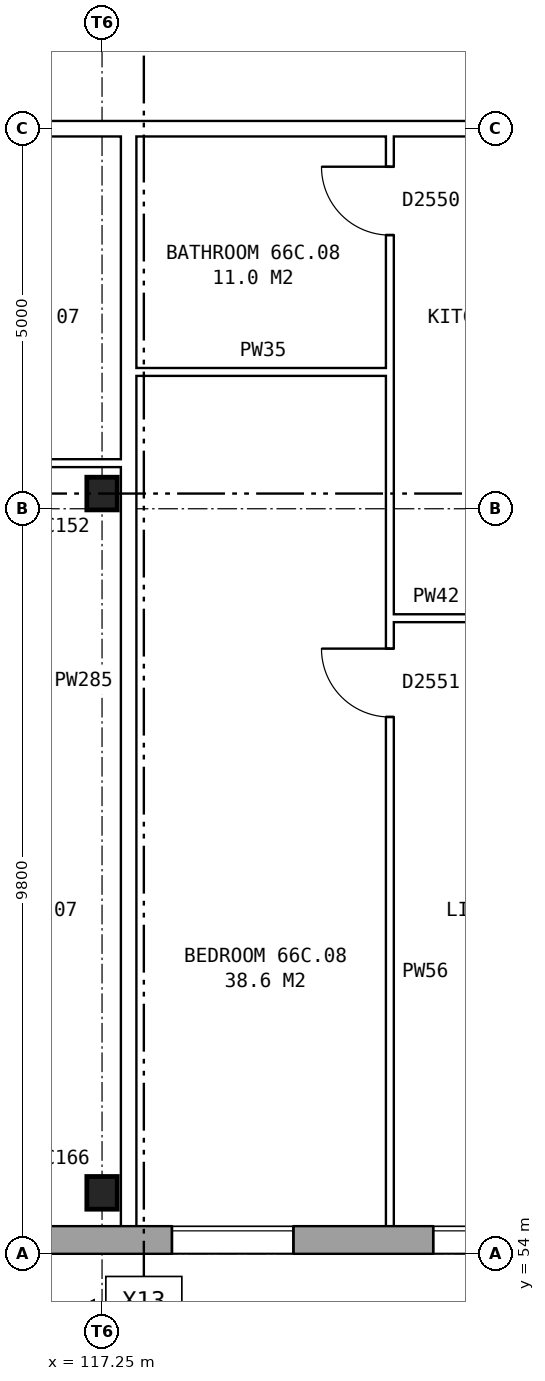
"""IFC4 building model, lengths in metres.
Left out: names, types, materials, properties, quantities, classifications, styles, units other than length and angle.
Written with IfcOpenShell. Run it as: python <this file> out.ifc"""

import sys

from ifc_helpers import new_model, si_unit, direction, frame, frame_2d, origin, origin_2d, place, context, subcontext, project, spatial, rectangle, i_section, extrude, element, fill, save


model = new_model("IFC4")
c1 = context("Model", 3, precision=1e-05, world=origin(), true_north=direction((0.0, 1.0)))
c2 = subcontext(c1, "Body", "Model", "MODEL_VIEW")
j1 = project(units=[si_unit("LENGTHUNIT", "METRE"), si_unit("PLANEANGLEUNIT", "RADIAN")], contexts=[c1])
p1 = place(None, origin())
s1 = spatial("IfcSite", under=j1, at=p1, CompositionType="ELEMENT")
p2 = place(p1, origin())
s2 = spatial("IfcBuilding", under=s1, at=p2, CompositionType="ELEMENT")
p3 = place(p2, frame((0.0, 0.0, 233.8)))
s3 = spatial("IfcBuildingStorey", under=s2, at=p3, CompositionType="ELEMENT", Elevation=233.8)
for number, where, z_axis, x_axis in (
    (1, (117.25, 54.8, 0.0), (0.0, 0.0, 1.0), (1.0, 0.0, 0.0)),
    (2, (117.25, 64.0, 0.0), (0.0, 0.0, 1.0), (1.0, 0.0, 0.0)),
):
    element("IfcColumn", number, at=place(p3, frame(where, z_axis=z_axis, x_axis=x_axis)), inside=s3, PredefinedType="COLUMN", context=c2, shape_type="SweptSolid", body=[
        extrude(i_section(OverallWidth=0.4, OverallDepth=0.43, WebThickness=0.028, FlangeThickness=0.04, at=origin_2d()), origin(), (0.0, 0.0, 1.0), 2.85),
    ])
p4 = place(p3, frame((75.95, 54.18, 0.0), z_axis=(0.0, 0.0, 1.0), x_axis=(1.0, 0.0, 0.0)))
e3 = element("IfcWall", 3, at=p4, inside=s3, PredefinedType="STANDARD", context=c2, shape_type="SweptSolid", body=[
    extrude(rectangle(XDim=55.1, YDim=0.36, at=frame_2d((27.55, 0.0))), origin(), (0.0, 0.0, 1.0), 2.85),
])
p5 = place(p4, frame((0.969, 0.0, 0.8)))
e4 = element("IfcOpeningElement", 4, at=p5, cuts=e3, PredefinedType="OPENING", context=c2, shape_type="SweptSolid", body=[
    extrude(rectangle(XDim=1.6, YDim=1.8, at=frame_2d((0.8, 0.9))), frame((0.0, 0.19, 0.0), z_axis=(0.0, -1.0, 0.0), x_axis=(1.0, 0.0, 0.0)), (0.0, 0.0, 1.0), 0.38),
])
p6 = place(p4, frame((4.406, 0.0, 0.8)))
e5 = element("IfcOpeningElement", 5, at=p6, cuts=e3, PredefinedType="OPENING", context=c2, shape_type="SweptSolid", body=[
    extrude(rectangle(XDim=1.6, YDim=1.8, at=frame_2d((0.8, 0.9))), frame((0.0, 0.19, 0.0), z_axis=(0.0, -1.0, 0.0), x_axis=(1.0, 0.0, 0.0)), (0.0, 0.0, 1.0), 0.38),
])
p7 = place(p4, frame((7.844, 0.0, 0.8)))
e6 = element("IfcOpeningElement", 6, at=p7, cuts=e3, PredefinedType="OPENING", context=c2, shape_type="SweptSolid", body=[
    extrude(rectangle(XDim=1.6, YDim=1.8, at=frame_2d((0.8, 0.9))), frame((0.0, 0.19, 0.0), z_axis=(0.0, -1.0, 0.0), x_axis=(1.0, 0.0, 0.0)), (0.0, 0.0, 1.0), 0.38),
])
p8 = place(p4, frame((11.281, 0.0, 0.8)))
e7 = element("IfcOpeningElement", 7, at=p8, cuts=e3, PredefinedType="OPENING", context=c2, shape_type="SweptSolid", body=[
    extrude(rectangle(XDim=1.6, YDim=1.8, at=frame_2d((0.8, 0.9))), frame((0.0, 0.19, 0.0), z_axis=(0.0, -1.0, 0.0), x_axis=(1.0, 0.0, 0.0)), (0.0, 0.0, 1.0), 0.38),
])
p9 = place(p4, frame((14.719, 0.0, 0.8)))
e8 = element("IfcOpeningElement", 8, at=p9, cuts=e3, PredefinedType="OPENING", context=c2, shape_type="SweptSolid", body=[
    extrude(rectangle(XDim=1.6, YDim=1.8, at=frame_2d((0.8, 0.9))), frame((0.0, 0.19, 0.0), z_axis=(0.0, -1.0, 0.0), x_axis=(1.0, 0.0, 0.0)), (0.0, 0.0, 1.0), 0.38),
])
p10 = place(p4, frame((18.156, 0.0, 0.8)))
e9 = element("IfcOpeningElement", 9, at=p10, cuts=e3, PredefinedType="OPENING", context=c2, shape_type="SweptSolid", body=[
    extrude(rectangle(XDim=1.6, YDim=1.8, at=frame_2d((0.8, 0.9))), frame((0.0, 0.19, 0.0), z_axis=(0.0, -1.0, 0.0), x_axis=(1.0, 0.0, 0.0)), (0.0, 0.0, 1.0), 0.38),
])
p11 = place(p4, frame((21.594, 0.0, 0.8)))
e10 = element("IfcOpeningElement", 10, at=p11, cuts=e3, PredefinedType="OPENING", context=c2, shape_type="SweptSolid", body=[
    extrude(rectangle(XDim=1.6, YDim=1.8, at=frame_2d((0.8, 0.9))), frame((0.0, 0.19, 0.0), z_axis=(0.0, -1.0, 0.0), x_axis=(1.0, 0.0, 0.0)), (0.0, 0.0, 1.0), 0.38),
])
p12 = place(p4, frame((25.031, 0.0, 0.8)))
e11 = element("IfcOpeningElement", 11, at=p12, cuts=e3, PredefinedType="OPENING", context=c2, shape_type="SweptSolid", body=[
    extrude(rectangle(XDim=1.6, YDim=1.8, at=frame_2d((0.8, 0.9))), frame((0.0, 0.19, 0.0), z_axis=(0.0, -1.0, 0.0), x_axis=(1.0, 0.0, 0.0)), (0.0, 0.0, 1.0), 0.38),
])
p13 = place(p4, frame((28.469, 0.0, 0.8)))
e12 = element("IfcOpeningElement", 12, at=p13, cuts=e3, PredefinedType="OPENING", context=c2, shape_type="SweptSolid", body=[
    extrude(rectangle(XDim=1.6, YDim=1.8, at=frame_2d((0.8, 0.9))), frame((0.0, 0.19, 0.0), z_axis=(0.0, -1.0, 0.0), x_axis=(1.0, 0.0, 0.0)), (0.0, 0.0, 1.0), 0.38),
])
p14 = place(p4, frame((31.906, 0.0, 0.8)))
e13 = element("IfcOpeningElement", 13, at=p14, cuts=e3, PredefinedType="OPENING", context=c2, shape_type="SweptSolid", body=[
    extrude(rectangle(XDim=1.6, YDim=1.8, at=frame_2d((0.8, 0.9))), frame((0.0, 0.19, 0.0), z_axis=(0.0, -1.0, 0.0), x_axis=(1.0, 0.0, 0.0)), (0.0, 0.0, 1.0), 0.38),
])
p15 = place(p4, frame((35.344, 0.0, 0.8)))
e14 = element("IfcOpeningElement", 14, at=p15, cuts=e3, PredefinedType="OPENING", context=c2, shape_type="SweptSolid", body=[
    extrude(rectangle(XDim=1.6, YDim=1.8, at=frame_2d((0.8, 0.9))), frame((0.0, 0.19, 0.0), z_axis=(0.0, -1.0, 0.0), x_axis=(1.0, 0.0, 0.0)), (0.0, 0.0, 1.0), 0.38),
])
p16 = place(p4, frame((38.781, 0.0, 0.8)))
e15 = element("IfcOpeningElement", 15, at=p16, cuts=e3, PredefinedType="OPENING", context=c2, shape_type="SweptSolid", body=[
    extrude(rectangle(XDim=1.6, YDim=1.8, at=frame_2d((0.8, 0.9))), frame((0.0, 0.19, 0.0), z_axis=(0.0, -1.0, 0.0), x_axis=(1.0, 0.0, 0.0)), (0.0, 0.0, 1.0), 0.38),
])
p17 = place(p4, frame((42.219, 0.0, 0.8)))
e16 = element("IfcOpeningElement", 16, at=p17, cuts=e3, PredefinedType="OPENING", context=c2, shape_type="SweptSolid", body=[
    extrude(rectangle(XDim=1.6, YDim=1.8, at=frame_2d((0.8, 0.9))), frame((0.0, 0.19, 0.0), z_axis=(0.0, -1.0, 0.0), x_axis=(1.0, 0.0, 0.0)), (0.0, 0.0, 1.0), 0.38),
])
p18 = place(p4, frame((45.656, 0.0, 0.8)))
e17 = element("IfcOpeningElement", 17, at=p18, cuts=e3, PredefinedType="OPENING", context=c2, shape_type="SweptSolid", body=[
    extrude(rectangle(XDim=1.6, YDim=1.8, at=frame_2d((0.8, 0.9))), frame((0.0, 0.19, 0.0), z_axis=(0.0, -1.0, 0.0), x_axis=(1.0, 0.0, 0.0)), (0.0, 0.0, 1.0), 0.38),
])
p19 = place(p4, frame((49.094, 0.0, 0.8)))
e18 = element("IfcOpeningElement", 18, at=p19, cuts=e3, PredefinedType="OPENING", context=c2, shape_type="SweptSolid", body=[
    extrude(rectangle(XDim=1.6, YDim=1.8, at=frame_2d((0.8, 0.9))), frame((0.0, 0.19, 0.0), z_axis=(0.0, -1.0, 0.0), x_axis=(1.0, 0.0, 0.0)), (0.0, 0.0, 1.0), 0.38),
])
p20 = place(p4, frame((52.531, 0.0, 0.8)))
e19 = element("IfcOpeningElement", 19, at=p20, cuts=e3, PredefinedType="OPENING", context=c2, shape_type="SweptSolid", body=[
    extrude(rectangle(XDim=1.6, YDim=1.8, at=frame_2d((0.8, 0.9))), frame((0.0, 0.19, 0.0), z_axis=(0.0, -1.0, 0.0), x_axis=(1.0, 0.0, 0.0)), (0.0, 0.0, 1.0), 0.38),
])
p21 = place(p3, frame((121.037, 62.36, 0.0), z_axis=(0.0, 0.0, 1.0), x_axis=(1.0, 0.0, 0.0)))
e20 = element("IfcWall", 20, at=p21, inside=s3, PredefinedType="PARTITIONING", context=c2, shape_type="SweptSolid", body=[
    extrude(rectangle(XDim=3.338, YDim=0.1, at=frame_2d((1.669, 0.0))), origin(), (0.0, 0.0, 1.0), 2.85),
])
p22 = place(p21, frame((1.219, 0.0, 0.0)))
e21 = element("IfcOpeningElement", 21, at=p22, cuts=e20, PredefinedType="OPENING", context=c2, shape_type="SweptSolid", body=[
    extrude(rectangle(XDim=0.9, YDim=2.1, at=frame_2d((0.45, 1.05))), frame((0.0, 0.06, 0.0), z_axis=(0.0, -1.0, 0.0), x_axis=(1.0, 0.0, 0.0)), (0.0, 0.0, 1.0), 0.12),
])
p23 = place(p3, frame((114.162, 64.4, 0.0), z_axis=(0.0, 0.0, 1.0), x_axis=(1.0, 0.0, 0.0)))
e22 = element("IfcWall", 22, at=p23, inside=s3, PredefinedType="PARTITIONING", context=c2, shape_type="SweptSolid", body=[
    extrude(rectangle(XDim=3.338, YDim=0.1, at=frame_2d((1.669, 0.0))), origin(), (0.0, 0.0, 1.0), 2.85),
])
p24 = place(p3, frame((117.7, 65.6, 0.0), z_axis=(0.0, 0.0, 1.0), x_axis=(1.0, 0.0, 0.0)))
e23 = element("IfcWall", 23, at=p24, inside=s3, PredefinedType="PARTITIONING", context=c2, shape_type="SweptSolid", body=[
    extrude(rectangle(XDim=3.337, YDim=0.1, at=frame_2d((1.668, 0.0))), origin(), (0.0, 0.0, 1.0), 2.85),
])
p25 = place(p3, frame((75.64, 68.8, 0.0), z_axis=(0.0, 0.0, 1.0), x_axis=(1.0, 0.0, 0.0)))
e24 = element("IfcWall", 24, at=p25, inside=s3, PredefinedType="PARTITIONING", context=c2, shape_type="SweptSolid", body=[
    extrude(rectangle(XDim=55.72, YDim=0.2, at=frame_2d((27.86, 0.0))), origin(), (0.0, 0.0, 1.0), 2.85),
])
p26 = place(p25, frame((5.191, 0.0, 0.0)))
e25 = element("IfcOpeningElement", 25, at=p26, cuts=e24, PredefinedType="OPENING", context=c2, shape_type="SweptSolid", body=[
    extrude(rectangle(XDim=1.0, YDim=2.1, at=frame_2d((0.5, 1.05))), frame((0.0, 0.11, 0.0), z_axis=(0.0, -1.0, 0.0), x_axis=(1.0, 0.0, 0.0)), (0.0, 0.0, 1.0), 0.22),
])
p27 = place(p25, frame((12.241, 0.0, 0.0)))
e26 = element("IfcOpeningElement", 26, at=p27, cuts=e24, PredefinedType="OPENING", context=c2, shape_type="SweptSolid", body=[
    extrude(rectangle(XDim=1.0, YDim=2.1, at=frame_2d((0.5, 1.05))), frame((0.0, 0.11, 0.0), z_axis=(0.0, -1.0, 0.0), x_axis=(1.0, 0.0, 0.0)), (0.0, 0.0, 1.0), 0.22),
])
p28 = place(p25, frame((22.553, 0.0, 0.0)))
e27 = element("IfcOpeningElement", 27, at=p28, cuts=e24, PredefinedType="OPENING", context=c2, shape_type="SweptSolid", body=[
    extrude(rectangle(XDim=1.0, YDim=2.1, at=frame_2d((0.5, 1.05))), frame((0.0, 0.11, 0.0), z_axis=(0.0, -1.0, 0.0), x_axis=(1.0, 0.0, 0.0)), (0.0, 0.0, 1.0), 0.22),
])
p29 = place(p25, frame((32.866, 0.0, 0.0)))
e28 = element("IfcOpeningElement", 28, at=p29, cuts=e24, PredefinedType="OPENING", context=c2, shape_type="SweptSolid", body=[
    extrude(rectangle(XDim=1.0, YDim=2.1, at=frame_2d((0.5, 1.05))), frame((0.0, 0.11, 0.0), z_axis=(0.0, -1.0, 0.0), x_axis=(1.0, 0.0, 0.0)), (0.0, 0.0, 1.0), 0.22),
])
p30 = place(p25, frame((36.303, 0.0, 0.0)))
e29 = element("IfcOpeningElement", 29, at=p30, cuts=e24, PredefinedType="OPENING", context=c2, shape_type="SweptSolid", body=[
    extrude(rectangle(XDim=1.0, YDim=2.1, at=frame_2d((0.5, 1.05))), frame((0.0, 0.11, 0.0), z_axis=(0.0, -1.0, 0.0), x_axis=(1.0, 0.0, 0.0)), (0.0, 0.0, 1.0), 0.22),
])
p31 = place(p25, frame((46.616, 0.0, 0.0)))
e30 = element("IfcOpeningElement", 30, at=p31, cuts=e24, PredefinedType="OPENING", context=c2, shape_type="SweptSolid", body=[
    extrude(rectangle(XDim=1.0, YDim=2.1, at=frame_2d((0.5, 1.05))), frame((0.0, 0.11, 0.0), z_axis=(0.0, -1.0, 0.0), x_axis=(1.0, 0.0, 0.0)), (0.0, 0.0, 1.0), 0.22),
])
p32 = place(p25, frame((53.496, 0.0, 0.0)))
e31 = element("IfcOpeningElement", 31, at=p32, cuts=e24, PredefinedType="OPENING", context=c2, shape_type="SweptSolid", body=[
    extrude(rectangle(XDim=1.0, YDim=2.1, at=frame_2d((0.5, 1.05))), frame((0.0, 0.11, 0.0), z_axis=(0.0, -1.0, 0.0), x_axis=(1.0, 0.0, 0.0)), (0.0, 0.0, 1.0), 0.22),
])
p33 = place(p3, frame((117.6, 54.36, 0.0), z_axis=(0.0, 0.0, 1.0), x_axis=(0.0, 1.0, 0.0)))
e32 = element("IfcWall", 32, at=p33, inside=s3, PredefinedType="PARTITIONING", context=c2, shape_type="SweptSolid", body=[
    extrude(rectangle(XDim=14.34, YDim=0.2, at=frame_2d((7.17, 0.0))), origin(), (0.0, 0.0, 1.0), 2.85),
])
p34 = place(p3, frame((121.037, 54.36, 0.0), z_axis=(0.0, 0.0, 1.0), x_axis=(0.0, 1.0, 0.0)))
e33 = element("IfcWall", 33, at=p34, inside=s3, PredefinedType="PARTITIONING", context=c2, shape_type="SweptSolid", body=[
    extrude(rectangle(XDim=14.34, YDim=0.1, at=frame_2d((7.17, 0.0))), origin(), (0.0, 0.0, 1.0), 2.85),
])
p35 = place(p34, frame((6.7, 0.0, 0.0)))
e34 = element("IfcOpeningElement", 34, at=p35, cuts=e33, PredefinedType="OPENING", context=c2, shape_type="SweptSolid", body=[
    extrude(rectangle(XDim=0.9, YDim=2.1, at=frame_2d((0.45, 1.05))), frame((0.0, 0.06, 0.0), z_axis=(0.0, -1.0, 0.0), x_axis=(1.0, 0.0, 0.0)), (0.0, 0.0, 1.0), 0.12),
])
p36 = place(p34, frame((13.04, 0.0, 0.0)))
e35 = element("IfcOpeningElement", 35, at=p36, cuts=e33, PredefinedType="OPENING", context=c2, shape_type="SweptSolid", body=[
    extrude(rectangle(XDim=0.9, YDim=2.1, at=frame_2d((0.45, 1.05))), frame((0.0, 0.06, 0.0), z_axis=(0.0, -1.0, 0.0), x_axis=(1.0, 0.0, 0.0)), (0.0, 0.0, 1.0), 0.12),
])
p37 = place(p17, origin())
e36 = element("IfcWindow", 36, at=p37, inside=s3, PartitioningType="SINGLE_PANEL", PredefinedType="WINDOW", context=c2, shape_type="SweptSolid", body=[
    extrude(rectangle(XDim=1.6, YDim=1.8, at=frame_2d((0.8, 0.9))), frame((0.0, 0.15, 0.0), z_axis=(0.0, -1.0, 0.0), x_axis=(1.0, 0.0, 0.0)), (0.0, 0.0, 1.0), 0.06),
])
fill(e16, e36)
p38 = place(p18, origin())
e37 = element("IfcWindow", 37, at=p38, inside=s3, PartitioningType="SINGLE_PANEL", PredefinedType="WINDOW", context=c2, shape_type="SweptSolid", body=[
    extrude(rectangle(XDim=1.6, YDim=1.8, at=frame_2d((0.8, 0.9))), frame((0.0, 0.15, 0.0), z_axis=(0.0, -1.0, 0.0), x_axis=(1.0, 0.0, 0.0)), (0.0, 0.0, 1.0), 0.06),
])
fill(e17, e37)
p39 = place(p35, origin())
e38 = element("IfcDoor", 38, at=p39, inside=s3, OperationType="SINGLE_SWING_RIGHT", PredefinedType="DOOR", context=c2, shape_type="SweptSolid", body=[
    extrude(rectangle(XDim=0.9, YDim=2.1, at=frame_2d((0.45, 1.05))), frame((0.0, 0.025, 0.0), z_axis=(0.0, -1.0, 0.0), x_axis=(1.0, 0.0, 0.0)), (0.0, 0.0, 1.0), 0.05),
])
fill(e34, e38)
p40 = place(p36, origin())
e39 = element("IfcDoor", 39, at=p40, inside=s3, OperationType="SINGLE_SWING_RIGHT", PredefinedType="DOOR", context=c2, shape_type="SweptSolid", body=[
    extrude(rectangle(XDim=0.9, YDim=2.1, at=frame_2d((0.45, 1.05))), frame((0.0, 0.025, 0.0), z_axis=(0.0, -1.0, 0.0), x_axis=(1.0, 0.0, 0.0)), (0.0, 0.0, 1.0), 0.05),
])
fill(e35, e39)
save(model, sys.argv[1])
